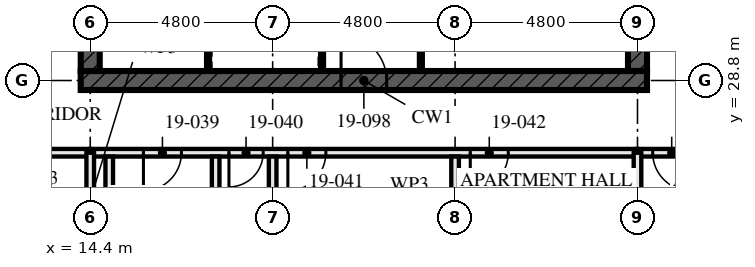
"""IFC4 building model, lengths in metres.
Left out: names, types, materials, properties, quantities, classifications, styles, units other than length and angle.
Written with IfcOpenShell. Run it as: python <this file> out.ifc"""

import sys

from ifc_helpers import new_model, si_unit, direction, frame, frame_2d, origin, place, context, subcontext, project, spatial, rectangle, extrude, element, fill, save


model = new_model("IFC4")
c1 = context("Model", 3, precision=1e-05, world=origin(), true_north=direction((0.0, 1.0)))
c2 = subcontext(c1, "Body", "Model", "MODEL_VIEW")
j1 = project(units=[si_unit("LENGTHUNIT", "METRE"), si_unit("PLANEANGLEUNIT", "RADIAN")], contexts=[c1])
p1 = place(None, origin())
s1 = spatial("IfcSite", under=j1, at=p1, CompositionType="ELEMENT")
p2 = place(p1, origin())
s2 = spatial("IfcBuilding", under=s1, at=p2, CompositionType="ELEMENT")
p3 = place(p2, frame((0.0, 0.0, 72.5)))
s3 = spatial("IfcBuildingStorey", under=s2, at=p3, CompositionType="ELEMENT", Elevation=72.5)
p4 = place(p3, frame((14.15, 28.8, -0.17), z_axis=(0.0, 0.0, 1.0), x_axis=(1.0, 0.0, 0.0)))
e1 = element("IfcWall", 1, at=p4, inside=s3, PredefinedType="SHEAR", context=c2, shape_type="SweptSolid", body=[
    extrude(rectangle(XDim=14.9, YDim=0.5, at=frame_2d((7.45, 0.0))), origin(), (0.0, 0.0, 1.0), 3.5),
])
p5 = place(p4, frame((6.85, 0.0, 0.17)))
e2 = element("IfcOpeningElement", 2, at=p5, cuts=e1, PredefinedType="OPENING", context=c2, shape_type="SweptSolid", body=[
    extrude(rectangle(XDim=1.2, YDim=2.1, at=frame_2d((0.6, 1.05))), frame((0.0, 0.26, 0.0), z_axis=(0.0, -1.0, 0.0), x_axis=(1.0, 0.0, 0.0)), (0.0, 0.0, 1.0), 0.521),
])
p6 = place(p3, frame((14.4, 42.95, -0.17), z_axis=(0.0, 0.0, 1.0), x_axis=(0.0, -1.0, 0.0)))
e3 = element("IfcWall", 3, at=p6, inside=s3, PredefinedType="SHEAR", context=c2, shape_type="SweptSolid", body=[
    extrude(rectangle(XDim=13.9, YDim=0.5, at=frame_2d((6.95, 0.0))), origin(), (0.0, 0.0, 1.0), 3.5),
])
p7 = place(p6, frame((6.35, 0.0, 0.17)))
e4 = element("IfcOpeningElement", 4, at=p7, cuts=e3, PredefinedType="OPENING", context=c2, shape_type="SweptSolid", body=[
    extrude(rectangle(XDim=1.2, YDim=2.1, at=frame_2d((0.6, 1.05))), frame((0.0, 0.26, 0.0), z_axis=(0.0, -1.0, 0.0), x_axis=(1.0, 0.0, 0.0)), (0.0, 0.0, 1.0), 0.521),
])
p8 = place(p3, frame((28.8, 29.05, -0.17), z_axis=(0.0, 0.0, 1.0), x_axis=(0.0, 1.0, 0.0)))
e5 = element("IfcWall", 5, at=p8, inside=s3, PredefinedType="SHEAR", context=c2, shape_type="SweptSolid", body=[
    extrude(rectangle(XDim=13.9, YDim=0.5, at=frame_2d((6.95, 0.0))), origin(), (0.0, 0.0, 1.0), 3.5),
])
p9 = place(p8, frame((6.35, 0.0, 0.17)))
e6 = element("IfcOpeningElement", 6, at=p9, cuts=e5, PredefinedType="OPENING", context=c2, shape_type="SweptSolid", body=[
    extrude(rectangle(XDim=1.2, YDim=2.1, at=frame_2d((0.6, 1.05))), frame((0.0, 0.26, 0.0), z_axis=(0.0, -1.0, 0.0), x_axis=(1.0, 0.0, 0.0)), (0.0, 0.0, 1.0), 0.521),
])
p10 = place(p3, frame((4.8, 26.9, 0.0), z_axis=(0.0, 0.0, 1.0), x_axis=(1.0, 0.0, 0.0)))
e7 = element("IfcWall", 7, at=p10, inside=s3, PredefinedType="PARTITIONING", context=c2, shape_type="SweptSolid", body=[
    extrude(rectangle(XDim=9.6, YDim=0.2, at=frame_2d((4.8, 0.0))), origin(), (0.0, 0.0, 1.0), 3.33),
])
p11 = place(p10, frame((0.4, 0.0, 0.0)))
e8 = element("IfcOpeningElement", 8, at=p11, cuts=e7, PredefinedType="OPENING", context=c2, shape_type="SweptSolid", body=[
    extrude(rectangle(XDim=1.0, YDim=2.1, at=frame_2d((0.5, 1.05))), frame((0.0, 0.111, 0.0), z_axis=(0.0, -1.0, 0.0), x_axis=(1.0, 0.0, 0.0)), (0.0, 0.0, 1.0), 0.221),
])
p12 = place(p10, frame((5.2, 0.0, 0.0)))
e9 = element("IfcOpeningElement", 9, at=p12, cuts=e7, PredefinedType="OPENING", context=c2, shape_type="SweptSolid", body=[
    extrude(rectangle(XDim=1.0, YDim=2.1, at=frame_2d((0.5, 1.05))), frame((0.0, 0.111, 0.0), z_axis=(0.0, -1.0, 0.0), x_axis=(1.0, 0.0, 0.0)), (0.0, 0.0, 1.0), 0.221),
])
for number, where, z_axis, x_axis in (
    (10, (14.9, 22.1, 0.0), (0.0, 0.0, 1.0), (0.0, 1.0, 0.0)),
    (11, (17.7, 22.1, 0.0), (0.0, 0.0, 1.0), (0.0, 1.0, 0.0)),
):
    element("IfcWall", number, at=place(p3, frame(where, z_axis=z_axis, x_axis=x_axis)), inside=s3, PredefinedType="SOLIDWALL", context=c2, shape_type="SweptSolid", body=[
        extrude(rectangle(XDim=4.7, YDim=0.2, at=frame_2d((2.35, 0.0))), origin(), (0.0, 0.0, 1.0), 2.99),
    ])
for number, where, z_axis, x_axis in (
    (12, (19.2, 14.72, 0.0), (0.0, 0.0, 1.0), (0.0, 1.0, 0.0)),
    (13, (24.0, 14.72, 0.0), (0.0, 0.0, 1.0), (0.0, 1.0, 0.0)),
):
    element("IfcWall", number, at=place(p3, frame(where, z_axis=z_axis, x_axis=x_axis)), inside=s3, PredefinedType="PARTITIONING", context=c2, shape_type="SweptSolid", body=[
        extrude(rectangle(XDim=12.08, YDim=0.2, at=frame_2d((6.04, 0.0))), origin(), (0.0, 0.0, 1.0), 2.55),
    ])
p13 = place(p3, frame((14.4, 26.9, 0.0), z_axis=(0.0, 0.0, 1.0), x_axis=(1.0, 0.0, 0.0)))
e14 = element("IfcWall", 14, at=p13, inside=s3, PredefinedType="PARTITIONING", context=c2, shape_type="SweptSolid", body=[
    extrude(rectangle(XDim=14.4, YDim=0.2, at=frame_2d((7.2, 0.0))), origin(), (0.0, 0.0, 1.0), 2.55),
])
p14 = place(p13, frame((1.4, 0.0, 0.0)))
e15 = element("IfcOpeningElement", 15, at=p14, cuts=e14, PredefinedType="OPENING", context=c2, shape_type="SweptSolid", body=[
    extrude(rectangle(XDim=1.0, YDim=2.1, at=frame_2d((0.5, 1.05))), frame((0.0, 0.111, 0.0), z_axis=(0.0, -1.0, 0.0), x_axis=(1.0, 0.0, 0.0)), (0.0, 0.0, 1.0), 0.221),
])
p15 = place(p13, frame((3.65, 0.0, 0.0)))
e16 = element("IfcOpeningElement", 16, at=p15, cuts=e14, PredefinedType="OPENING", context=c2, shape_type="SweptSolid", body=[
    extrude(rectangle(XDim=0.9, YDim=2.1, at=frame_2d((0.45, 1.05))), frame((0.0, 0.111, 0.0), z_axis=(0.0, -1.0, 0.0), x_axis=(1.0, 0.0, 0.0)), (0.0, 0.0, 1.0), 0.221),
])
p16 = place(p13, frame((5.2, 0.0, 0.0)))
e17 = element("IfcOpeningElement", 17, at=p16, cuts=e14, PredefinedType="OPENING", context=c2, shape_type="SweptSolid", body=[
    extrude(rectangle(XDim=1.0, YDim=2.1, at=frame_2d((0.5, 1.05))), frame((0.0, 0.111, 0.0), z_axis=(0.0, -1.0, 0.0), x_axis=(1.0, 0.0, 0.0)), (0.0, 0.0, 1.0), 0.221),
])
p17 = place(p13, frame((10.0, 0.0, 0.0)))
e18 = element("IfcOpeningElement", 18, at=p17, cuts=e14, PredefinedType="OPENING", context=c2, shape_type="SweptSolid", body=[
    extrude(rectangle(XDim=1.0, YDim=2.1, at=frame_2d((0.5, 1.05))), frame((0.0, 0.111, 0.0), z_axis=(0.0, -1.0, 0.0), x_axis=(1.0, 0.0, 0.0)), (0.0, 0.0, 1.0), 0.221),
])
p18 = place(p3, frame((28.8, 26.9, 0.0), z_axis=(0.0, 0.0, 1.0), x_axis=(1.0, 0.0, 0.0)))
e19 = element("IfcWall", 19, at=p18, inside=s3, PredefinedType="PARTITIONING", context=c2, shape_type="SweptSolid", body=[
    extrude(rectangle(XDim=9.6, YDim=0.2, at=frame_2d((4.8, 0.0))), origin(), (0.0, 0.0, 1.0), 3.33),
])
p19 = place(p18, frame((0.4, 0.0, 0.0)))
e20 = element("IfcOpeningElement", 20, at=p19, cuts=e19, PredefinedType="OPENING", context=c2, shape_type="SweptSolid", body=[
    extrude(rectangle(XDim=1.0, YDim=2.1, at=frame_2d((0.5, 1.05))), frame((0.0, 0.111, 0.0), z_axis=(0.0, -1.0, 0.0), x_axis=(1.0, 0.0, 0.0)), (0.0, 0.0, 1.0), 0.221),
])
p20 = place(p18, frame((5.2, 0.0, 0.0)))
e21 = element("IfcOpeningElement", 21, at=p20, cuts=e19, PredefinedType="OPENING", context=c2, shape_type="SweptSolid", body=[
    extrude(rectangle(XDim=1.0, YDim=2.1, at=frame_2d((0.5, 1.05))), frame((0.0, 0.111, 0.0), z_axis=(0.0, -1.0, 0.0), x_axis=(1.0, 0.0, 0.0)), (0.0, 0.0, 1.0), 0.221),
])
p21 = place(p3, frame((20.5, 29.05, 0.0), z_axis=(0.0, 0.0, 1.0), x_axis=(0.0, 1.0, 0.0)))
e22 = element("IfcWall", 22, at=p21, inside=s3, PredefinedType="SOLIDWALL", context=c2, shape_type="SweptSolid", body=[
    extrude(rectangle(XDim=5.8, YDim=0.1, at=frame_2d((2.9, 0.0))), origin(), (0.0, 0.0, 1.0), 3.33),
])
p22 = place(p21, frame((0.8, 0.0, 0.0)))
e23 = element("IfcOpeningElement", 23, at=p22, cuts=e22, PredefinedType="OPENING", context=c2, shape_type="SweptSolid", body=[
    extrude(rectangle(XDim=1.1, YDim=2.3, at=frame_2d((0.55, 1.15))), frame((0.0, 0.061, 0.0), z_axis=(0.0, -1.0, 0.0), x_axis=(1.0, 0.0, 0.0)), (0.0, 0.0, 1.0), 0.121),
])
p23 = place(p21, frame((3.775, 0.0, 0.0)))
e24 = element("IfcOpeningElement", 24, at=p23, cuts=e22, PredefinedType="OPENING", context=c2, shape_type="SweptSolid", body=[
    extrude(rectangle(XDim=1.1, YDim=2.3, at=frame_2d((0.55, 1.15))), frame((0.0, 0.061, 0.0), z_axis=(0.0, -1.0, 0.0), x_axis=(1.0, 0.0, 0.0)), (0.0, 0.0, 1.0), 0.121),
])
p24 = place(p3, frame((23.1, 29.05, 0.0), z_axis=(0.0, 0.0, 1.0), x_axis=(0.0, 1.0, 0.0)))
e25 = element("IfcWall", 25, at=p24, inside=s3, PredefinedType="SOLIDWALL", context=c2, shape_type="SweptSolid", body=[
    extrude(rectangle(XDim=5.8, YDim=0.1, at=frame_2d((2.9, 0.0))), origin(), (0.0, 0.0, 1.0), 3.33),
])
p25 = place(p24, frame((1.0, 0.0, 0.0)))
e26 = element("IfcOpeningElement", 26, at=p25, cuts=e25, PredefinedType="OPENING", context=c2, shape_type="SweptSolid", body=[
    extrude(rectangle(XDim=0.7, YDim=2.1, at=frame_2d((0.35, 1.05))), frame((0.0, 0.061, 0.0), z_axis=(0.0, -1.0, 0.0), x_axis=(1.0, 0.0, 0.0)), (0.0, 0.0, 1.0), 0.121),
])
p26 = place(p3, frame((17.5, 29.05, 0.0), z_axis=(0.0, 0.0, 1.0), x_axis=(0.0, 1.0, 0.0)))
e27 = element("IfcWall", 27, at=p26, inside=s3, PredefinedType="SOLIDWALL", context=c2, shape_type="SweptSolid", body=[
    extrude(rectangle(XDim=5.8, YDim=0.1, at=frame_2d((2.9, 0.0))), origin(), (0.0, 0.0, 1.0), 3.33),
])
for number, where, z_axis, x_axis in (
    (28, (14.4, 24.395, 0.0), (0.0, 0.0, 1.0), (0.0, 1.0, 0.0)),
    (29, (28.8, 24.395, 0.0), (0.0, 0.0, 1.0), (0.0, 1.0, 0.0)),
):
    element("IfcWall", number, at=place(p3, frame(where, z_axis=z_axis, x_axis=x_axis)), inside=s3, PredefinedType="PARTITIONING", context=c2, shape_type="SweptSolid", body=[
        extrude(rectangle(XDim=2.505, YDim=0.2, at=frame_2d((1.252, 0.0))), origin(), (0.0, 0.0, 1.0), 2.32),
    ])
p27 = place(p14, frame((1.0, 0.0, 0.0), z_axis=(0.0, 0.0, 1.0), x_axis=(-1.0, 0.0, 0.0)))
e30 = element("IfcDoor", 30, at=p27, inside=s3, OperationType="SINGLE_SWING_LEFT", PredefinedType="DOOR", context=c2, shape_type="SweptSolid", body=[
    extrude(rectangle(XDim=1.0, YDim=2.1, at=frame_2d((0.5, 1.05))), frame((0.0, 0.032, 0.0), z_axis=(0.0, -1.0, 0.0), x_axis=(1.0, 0.0, 0.0)), (0.0, 0.0, 1.0), 0.064),
])
fill(e15, e30)
p28 = place(p15, frame((0.9, 0.0, 0.0), z_axis=(0.0, 0.0, 1.0), x_axis=(-1.0, 0.0, 0.0)))
e31 = element("IfcDoor", 31, at=p28, inside=s3, OperationType="SINGLE_SWING_LEFT", PredefinedType="DOOR", context=c2, shape_type="SweptSolid", body=[
    extrude(rectangle(XDim=0.9, YDim=2.1, at=frame_2d((0.45, 1.05))), frame((0.0, 0.027, 0.0), z_axis=(0.0, -1.0, 0.0), x_axis=(1.0, 0.0, 0.0)), (0.0, 0.0, 1.0), 0.054),
])
fill(e16, e31)
p29 = place(p16, frame((1.0, 0.0, 0.0), z_axis=(0.0, 0.0, 1.0), x_axis=(-1.0, 0.0, 0.0)))
e32 = element("IfcDoor", 32, at=p29, inside=s3, OperationType="SINGLE_SWING_LEFT", PredefinedType="DOOR", context=c2, shape_type="SweptSolid", body=[
    extrude(rectangle(XDim=1.0, YDim=2.1, at=frame_2d((0.5, 1.05))), frame((0.0, 0.027, 0.0), z_axis=(0.0, -1.0, 0.0), x_axis=(1.0, 0.0, 0.0)), (0.0, 0.0, 1.0), 0.054),
])
fill(e17, e32)
p30 = place(p17, frame((1.0, 0.0, 0.0), z_axis=(0.0, 0.0, 1.0), x_axis=(-1.0, 0.0, 0.0)))
e33 = element("IfcDoor", 33, at=p30, inside=s3, OperationType="SINGLE_SWING_LEFT", PredefinedType="DOOR", context=c2, shape_type="SweptSolid", body=[
    extrude(rectangle(XDim=1.0, YDim=2.1, at=frame_2d((0.5, 1.05))), frame((0.0, 0.027, 0.0), z_axis=(0.0, -1.0, 0.0), x_axis=(1.0, 0.0, 0.0)), (0.0, 0.0, 1.0), 0.054),
])
fill(e18, e33)
p31 = place(p19, frame((1.0, 0.0, 0.0), z_axis=(0.0, 0.0, 1.0), x_axis=(-1.0, 0.0, 0.0)))
e34 = element("IfcDoor", 34, at=p31, inside=s3, OperationType="SINGLE_SWING_RIGHT", PredefinedType="DOOR", context=c2, shape_type="SweptSolid", body=[
    extrude(rectangle(XDim=1.0, YDim=2.1, at=frame_2d((0.5, 1.05))), frame((0.0, 0.027, 0.0), z_axis=(0.0, -1.0, 0.0), x_axis=(1.0, 0.0, 0.0)), (0.0, 0.0, 1.0), 0.054),
])
fill(e20, e34)
p32 = place(p5, origin())
e35 = element("IfcDoor", 35, at=p32, inside=s3, OperationType="SINGLE_SWING_LEFT", PredefinedType="DOOR", context=c2, shape_type="SweptSolid", body=[
    extrude(rectangle(XDim=1.2, YDim=2.1, at=frame_2d((0.6, 1.05))), frame((0.0, 0.027, 0.0), z_axis=(0.0, -1.0, 0.0), x_axis=(1.0, 0.0, 0.0)), (0.0, 0.0, 1.0), 0.054),
])
fill(e2, e35)
save(model, sys.argv[1])
